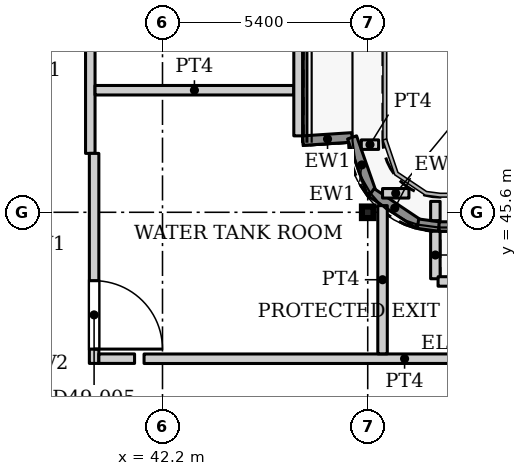
"""IFC4 building model, lengths in metres.
Left out: names, types, materials, properties, quantities, classifications, styles, units other than length and angle.
Written with IfcOpenShell. Run it as: python <this file> out.ifc"""

import sys

from ifc_helpers import new_model, si_unit, direction, frame, frame_2d, origin, origin_2d, place, context, subcontext, project, spatial, rectangle, hollow_rectangle, extrude, source, transform, mapped, element, fill, save


model = new_model("IFC4")
c1 = context("Model", 3, precision=1e-05, world=origin(), true_north=direction((0.0, 1.0)))
c2 = subcontext(c1, "Body", "Model", "MODEL_VIEW")
j1 = project(units=[si_unit("LENGTHUNIT", "METRE"), si_unit("PLANEANGLEUNIT", "RADIAN")], contexts=[c1])
p1 = place(None, origin())
s1 = spatial("IfcSite", under=j1, at=p1, CompositionType="ELEMENT")
p2 = place(p1, origin())
s2 = spatial("IfcBuilding", under=s1, at=p2, CompositionType="ELEMENT")
p3 = place(p2, frame((0.0, 0.0, 211.1)))
s3 = spatial("IfcBuildingStorey", under=s2, at=p3, CompositionType="ELEMENT", Elevation=211.1)
p4 = place(p3, frame((47.6, 45.6, 0.0), z_axis=(0.0, 0.0, 1.0), x_axis=(1.0, 0.0, 0.0)))
e1 = element("IfcColumn", 1, at=p4, inside=s3, PredefinedType="COLUMN", context=c2, shape_type="SweptSolid", body=[
    extrude(hollow_rectangle(XDim=0.305, YDim=0.305, WallThickness=0.016, InnerFilletRadius=0.016, OuterFilletRadius=0.032, at=origin_2d()), origin(), (0.0, 0.0, 1.0), 5.1),
])
p5 = place(p3, frame((45.897, 47.486, 0.0), z_axis=(0.0, 0.0, 1.0), x_axis=(0.997841571158, 0.065667334864, 0.0)))
e2 = element("IfcWall", 2, at=p5, inside=s3, PredefinedType="SOLIDWALL", context=c2, shape_type="SweptSolid", body=[
    extrude(rectangle(XDim=1.294, YDim=0.25, at=frame_2d((0.647, 0.0))), origin(), (0.0, 0.0, 1.0), 4.95),
])
p6 = place(p3, frame((47.188, 47.571, 0.0), z_axis=(0.0, 0.0, 1.0), x_axis=(0.331615835646, -0.943414509931, 0.0)))
e3 = element("IfcWall", 3, at=p6, inside=s3, PredefinedType="SOLIDWALL", context=c2, shape_type="SweptSolid", body=[
    extrude(rectangle(XDim=1.538, YDim=0.25, at=frame_2d((0.769, 0.0))), origin(), (0.0, 0.0, 1.0), 4.95),
])
p7 = place(p3, frame((47.698, 46.12, 0.0), z_axis=(0.0, 0.0, 1.0), x_axis=(0.831209040074, -0.555960009082, 0.0)))
e4 = element("IfcWall", 4, at=p7, inside=s3, PredefinedType="SOLIDWALL", context=c2, shape_type="SweptSolid", body=[
    extrude(rectangle(XDim=1.475, YDim=0.25, at=frame_2d((0.738, 0.0))), origin(), (0.0, 0.0, 1.0), 4.95),
])
p8 = place(p3, frame((48.924, 45.3, 0.0), z_axis=(0.0, 0.0, 1.0), x_axis=(0.990938998022, -0.134312703043, 0.0)))
e5 = element("IfcWall", 5, at=p8, inside=s3, PredefinedType="SOLIDWALL", context=c2, shape_type="SweptSolid", body=[
    extrude(rectangle(XDim=0.558, YDim=0.25, at=frame_2d((0.279, 0.0))), origin(), (0.0, 0.0, 1.0), 4.95),
])
p9 = place(p3, frame((49.477, 45.225, 0.0), z_axis=(0.0, 0.0, 1.0), x_axis=(1.0, 0.0, 0.0)))
e6 = element("IfcWall", 6, at=p9, inside=s3, PredefinedType="SOLIDWALL", context=c2, shape_type="SweptSolid", body=[
    extrude(rectangle(XDim=34.812, YDim=0.25, at=frame_2d((17.406, 0.0))), origin(), (0.0, 0.0, 1.0), 4.95),
])
p10 = place(p3, frame((40.3, 47.15, 0.0), z_axis=(0.0, 0.0, 1.0), x_axis=(0.0, 1.0, 0.0)))
e7 = element("IfcWall", 7, at=p10, inside=s3, PredefinedType="PARTITIONING", context=c2, shape_type="SweptSolid", body=[
    extrude(rectangle(XDim=9.285, YDim=0.25, at=frame_2d((4.643, 0.0))), origin(), (0.0, 0.0, 1.0), 4.8),
])
p11 = place(p10, frame((4.812, 0.0, 0.0)))
e8 = element("IfcOpeningElement", 8, at=p11, cuts=e7, PredefinedType="OPENING", context=c2, shape_type="SweptSolid", body=[
    extrude(rectangle(XDim=1.2, YDim=2.1, at=frame_2d((0.6, 1.05))), frame((0.0, 0.135, 0.0), z_axis=(0.0, -1.0, 0.0), x_axis=(1.0, 0.0, 0.0)), (0.0, 0.0, 1.0), 0.27),
])
p12 = place(p3, frame((40.4, 41.623, 0.0), z_axis=(0.0, 0.0, 1.0), x_axis=(0.0, 1.0, 0.0)))
e9 = element("IfcWall", 9, at=p12, inside=s3, PredefinedType="PARTITIONING", context=c2, shape_type="SweptSolid", body=[
    extrude(rectangle(XDim=5.527, YDim=0.25, at=frame_2d((2.763, 0.0))), origin(), (0.0, 0.0, 1.0), 4.8),
])
p13 = place(p12, frame((0.377, 0.0, 0.0)))
e10 = element("IfcOpeningElement", 10, at=p13, cuts=e9, PredefinedType="OPENING", context=c2, shape_type="SweptSolid", body=[
    extrude(rectangle(XDim=1.8, YDim=2.1, at=frame_2d((0.9, 1.05))), frame((0.0, 0.135, 0.0), z_axis=(0.0, -1.0, 0.0), x_axis=(1.0, 0.0, 0.0)), (0.0, 0.0, 1.0), 0.27),
])
p14 = place(p3, frame((40.425, 48.812, 0.0), z_axis=(0.0, 0.0, 1.0), x_axis=(1.0, 0.0, 0.0)))
e11 = element("IfcWall", 11, at=p14, inside=s3, PredefinedType="PARTITIONING", context=c2, shape_type="SweptSolid", body=[
    extrude(rectangle(XDim=5.23, YDim=0.25, at=frame_2d((2.615, 0.0))), origin(), (0.0, 0.0, 1.0), 4.8),
])
p15 = place(p3, frame((40.525, 41.748, 0.0), z_axis=(0.0, 0.0, 1.0), x_axis=(1.0, 0.0, 0.0)))
e12 = element("IfcWall", 12, at=p15, inside=s3, PredefinedType="PARTITIONING", context=c2, shape_type="SweptSolid", body=[
    extrude(rectangle(XDim=0.94, YDim=0.25, at=frame_2d((0.47, 0.0))), origin(), (0.0, 0.0, 1.0), 4.8),
])
p16 = place(p3, frame((41.715, 41.746, 0.0), z_axis=(0.0, 0.0, 1.0), x_axis=(0.999999989853, 0.000142460288, 0.0)))
e13 = element("IfcWall", 13, at=p16, inside=s3, PredefinedType="PARTITIONING", context=c2, shape_type="SweptSolid", body=[
    extrude(rectangle(XDim=13.71, YDim=0.25, at=frame_2d((6.855, 0.0))), origin(), (0.0, 0.0, 1.0), 4.8),
])
p17 = place(p3, frame((45.78, 47.611, 0.0), z_axis=(0.0, 0.0, 1.0), x_axis=(0.0, 1.0, 0.0)))
e14 = element("IfcWall", 14, at=p17, inside=s3, PredefinedType="PARTITIONING", context=c2, shape_type="SweptSolid", body=[
    extrude(rectangle(XDim=11.413, YDim=0.25, at=frame_2d((5.707, 0.0))), origin(), (0.0, 0.0, 1.0), 4.8),
])
p18 = place(p3, frame((47.431, 47.38, 0.0), z_axis=(0.0, 0.0, 1.0), x_axis=(1.0, 0.0, 0.0)))
e15 = element("IfcWall", 15, at=p18, inside=s3, PredefinedType="PARTITIONING", context=c2, shape_type="SweptSolid", body=[
    extrude(rectangle(XDim=0.456, YDim=0.25, at=frame_2d((0.228, 0.0))), origin(), (0.0, 0.0, 1.0), 4.8),
])
p19 = place(p3, frame((47.99, 41.875, 0.0), z_axis=(0.0, 0.0, 1.0), x_axis=(0.0, 1.0, 0.0)))
e16 = element("IfcWall", 16, at=p19, inside=s3, PredefinedType="PARTITIONING", context=c2, shape_type="SweptSolid", body=[
    extrude(rectangle(XDim=3.901, YDim=0.25, at=frame_2d((1.95, 0.0))), origin(), (0.0, 0.0, 1.0), 4.8),
])
p20 = place(p3, frame((47.99, 46.1, 0.0), z_axis=(0.0, 0.0, 1.0), x_axis=(1.0, 0.0, 0.0)))
e17 = element("IfcWall", 17, at=p20, inside=s3, PredefinedType="PARTITIONING", context=c2, shape_type="SweptSolid", body=[
    extrude(rectangle(XDim=0.694, YDim=0.25, at=frame_2d((0.347, 0.0))), origin(), (0.0, 0.0, 1.0), 4.8),
])
p21 = place(p3, frame((49.38, 43.851, 0.0), z_axis=(0.0, 0.0, 1.0), x_axis=(0.0, 1.0, 0.0)))
e18 = element("IfcWall", 18, at=p21, inside=s3, PredefinedType="PARTITIONING", context=c2, shape_type="SweptSolid", body=[
    extrude(rectangle(XDim=1.25, YDim=0.25, at=frame_2d((0.625, 0.0))), origin(), (0.0, 0.0, 1.0), 4.8),
])
p22 = place(p3, frame((49.38, 45.38, 0.0), z_axis=(0.0, 0.0, 1.0), x_axis=(0.0, 1.0, 0.0)))
e19 = element("IfcWall", 19, at=p22, inside=s3, PredefinedType="PARTITIONING", context=c2, shape_type="SweptSolid", body=[
    extrude(rectangle(XDim=0.507, YDim=0.25, at=frame_2d((0.253, 0.0))), origin(), (0.0, 0.0, 1.0), 4.8),
])
p23 = place(p3, frame((49.451, 43.78, 0.0), z_axis=(0.0, 0.0, 1.0), x_axis=(1.0, 0.0, 0.0)))
e20 = element("IfcWall", 20, at=p23, inside=s3, PredefinedType="PARTITIONING", context=c2, shape_type="SweptSolid", body=[
    extrude(rectangle(XDim=10.402, YDim=0.25, at=frame_2d((5.201, 0.0))), origin(), (0.0, 0.0, 1.0), 4.8),
])
m1 = source(origin(), c2, "Body", "SweptSolid", [
    extrude(rectangle(XDim=1.8, YDim=2.1, at=frame_2d((0.9, 1.05))), frame((0.0, 0.025, 0.0), z_axis=(0.0, -1.0, 0.0), x_axis=(1.0, 0.0, 0.0)), (0.0, 0.0, 1.0), 0.05),
])
p24 = place(p13, origin())
e21 = element("IfcDoor", 21, at=p24, inside=s3, OperationType="DOUBLE_DOOR_SINGLE_SWING", PredefinedType="DOOR", context=c2, shape_type="MappedRepresentation", body=[
    mapped(m1, transform((0.0, 0.0, 0.0), x_axis=(1.0, 0.0, 0.0), y_axis=(0.0, 1.0, 0.0), z_axis=(0.0, 0.0, 1.0), scale=1.0)),
])
fill(e10, e21)
save(model, sys.argv[1])
